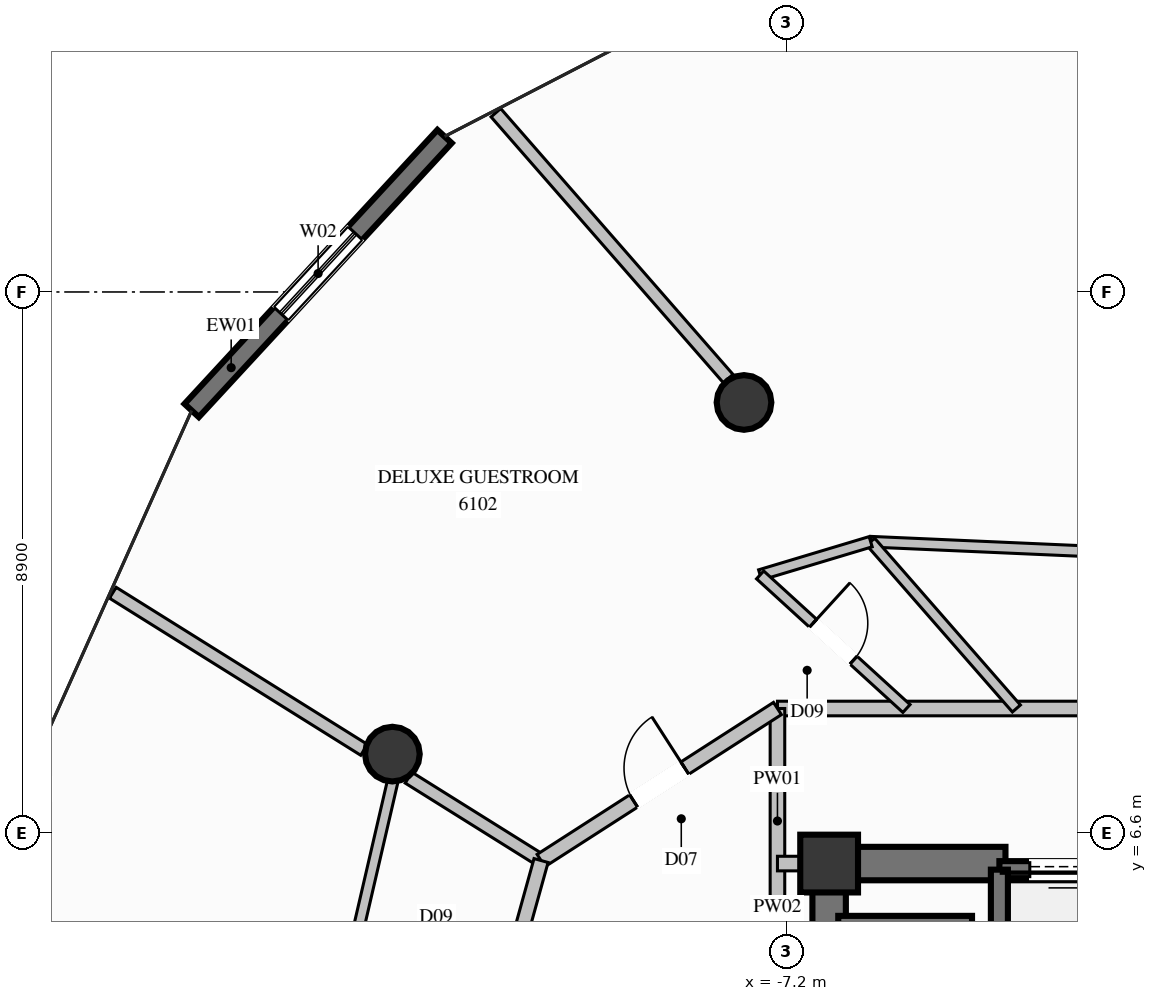
"""IFC4 building model, lengths in metres.
Left out: names, types, materials, properties, quantities, classifications, styles, units other than length and angle.
Written with IfcOpenShell. Run it as: python <this file> out.ifc"""

import sys

from ifc_helpers import new_model, si_unit, direction, frame, frame_2d, origin, origin_2d, place, context, subcontext, project, spatial, rectangle, circle, extrude, element, fill, save


model = new_model("IFC4")
c1 = context("Model", 3, precision=1e-05, world=origin(), true_north=direction((0.0, 1.0)))
c2 = subcontext(c1, "Body", "Model", "MODEL_VIEW")
j1 = project(units=[si_unit("LENGTHUNIT", "METRE"), si_unit("PLANEANGLEUNIT", "RADIAN")], contexts=[c1])
p1 = place(None, origin())
s1 = spatial("IfcSite", under=j1, at=p1, CompositionType="ELEMENT")
p2 = place(p1, origin())
s2 = spatial("IfcBuilding", under=s1, at=p2, CompositionType="ELEMENT")
p3 = place(p2, frame((0.0, 0.0, 227.2)))
s3 = spatial("IfcBuildingStorey", under=s2, at=p3, CompositionType="ELEMENT", Elevation=227.2)
p4 = place(p3, frame((-6.5, 6.1, 0.0), z_axis=(0.0, 0.0, 1.0), x_axis=(1.0, 0.0, 0.0)))
e1 = element("IfcColumn", 1, at=p4, inside=s3, PredefinedType="COLUMN", context=c2, shape_type="SweptSolid", body=[
    extrude(rectangle(XDim=0.95, YDim=0.95, at=origin_2d()), origin(), (0.0, 0.0, 1.0), 3.6),
])
p5 = place(p3, frame((-6.225, 6.1, 0.0), z_axis=(0.0, 0.0, 1.0), x_axis=(1.0, 0.0, 0.0)))
e2 = element("IfcWall", 2, at=p5, inside=s3, PredefinedType="SHEAR", context=c2, shape_type="SweptSolid", body=[
    extrude(rectangle(XDim=2.625, YDim=0.55, at=frame_2d((1.312, 0.0))), origin(), (0.0, 0.0, 1.0), 3.6),
])
p6 = place(p3, frame((-6.5, 2.35, 0.0), z_axis=(0.0, 0.0, 1.0), x_axis=(0.0, 1.0, 0.0)))
e3 = element("IfcWall", 3, at=p6, inside=s3, PredefinedType="SHEAR", context=c2, shape_type="SweptSolid", body=[
    extrude(rectangle(XDim=4.025, YDim=0.55, at=frame_2d((2.012, 0.0))), origin(), (0.0, 0.0, 1.0), 3.6),
])
for number, where, z_axis, x_axis in (
    (4, (-7.9, 13.683, 0.0), (0.0, 0.0, 1.0), (1.0, 0.0, 0.0)),
    (5, (-13.683, 7.9, 0.0), (0.0, 0.0, 1.0), (1.0, 0.0, 0.0)),
):
    element("IfcColumn", number, at=place(p3, frame(where, z_axis=z_axis, x_axis=x_axis)), inside=s3, PredefinedType="COLUMN", context=c2, shape_type="SweptSolid", body=[
        extrude(circle(Radius=0.45, at=origin_2d()), origin(), (0.0, 0.0, 1.0), 3.6),
    ])
p7 = place(p3, frame((-16.984, 13.551, 0.0), z_axis=(0.0, 0.0, 1.0), x_axis=(0.678251989905, 0.734829393935, 0.0)))
e6 = element("IfcWall", 6, at=p7, inside=s3, PredefinedType="SOLIDWALL", context=c2, shape_type="SweptSolid", body=[
    extrude(rectangle(XDim=6.132, YDim=0.32, at=frame_2d((3.066, 0.0))), origin(), (0.0, 0.0, 1.0), 3.36),
])
p8 = place(p7, frame((2.166, 0.0, 0.35)))
e7 = element("IfcOpeningElement", 7, at=p8, cuts=e6, PredefinedType="OPENING", context=c2, shape_type="SweptSolid", body=[
    extrude(rectangle(XDim=1.8, YDim=2.6, at=frame_2d((0.9, 1.3))), frame((0.0, 0.17, 0.0), z_axis=(0.0, -1.0, 0.0), x_axis=(1.0, 0.0, 0.0)), (0.0, 0.0, 1.0), 0.34),
])
p9 = place(p3, frame((-1.6, 6.0, 0.0), z_axis=(0.0, 0.0, 1.0), x_axis=(-1.0, 0.0, 0.0)))
e8 = element("IfcWall", 8, at=p9, inside=s3, PredefinedType="SOLIDWALL", context=c2, shape_type="SweptSolid", body=[
    extrude(rectangle(XDim=2.1, YDim=0.28, at=frame_2d((1.05, 0.0))), origin(), (0.0, 0.0, 1.0), 3.36),
])
p10 = place(p9, frame((0.5, 0.0, 0.0)))
e9 = element("IfcOpeningElement", 9, at=p10, cuts=e8, PredefinedType="OPENING", context=c2, shape_type="SweptSolid", body=[
    extrude(rectangle(XDim=1.1, YDim=2.2, at=frame_2d((0.55, 1.1))), frame((0.0, 0.15, 0.0), z_axis=(0.0, -1.0, 0.0), x_axis=(1.0, 0.0, 0.0)), (0.0, 0.0, 1.0), 0.3),
])
p11 = place(p3, frame((-3.7, 6.0, 0.0), z_axis=(0.0, 0.0, 1.0), x_axis=(0.0, -1.0, 0.0)))
e10 = element("IfcWall", 10, at=p11, inside=s3, PredefinedType="SOLIDWALL", context=c2, shape_type="SweptSolid", body=[
    extrude(rectangle(XDim=2.5, YDim=0.28, at=frame_2d((1.25, 0.0))), origin(), (0.0, 0.0, 1.0), 3.36),
])
p12 = place(p3, frame((-4.15, 5.1, 0.0), z_axis=(0.0, 0.0, 1.0), x_axis=(-1.0, 0.0, 0.0)))
e11 = element("IfcWall", 11, at=p12, inside=s3, PredefinedType="SOLIDWALL", context=c2, shape_type="SweptSolid", body=[
    extrude(rectangle(XDim=2.2, YDim=0.28, at=frame_2d((1.1, 0.0))), origin(), (0.0, 0.0, 1.0), 3.36),
])
p13 = place(p3, frame((-7.35, 8.65, 0.0), z_axis=(0.0, 0.0, 1.0), x_axis=(1.0, 0.0, 0.0)))
e12 = element("IfcWall", 12, at=p13, inside=s3, PredefinedType="PARTITIONING", context=c2, shape_type="SweptSolid", body=[
    extrude(rectangle(XDim=13.1, YDim=0.24, at=frame_2d((6.55, 0.0))), origin(), (0.0, 0.0, 1.0), 3.36),
])
p14 = place(p3, frame((-7.35, 4.95, 0.0), z_axis=(0.0, 0.0, 1.0), x_axis=(0.0, 1.0, 0.0)))
e13 = element("IfcWall", 13, at=p14, inside=s3, PredefinedType="PARTITIONING", context=c2, shape_type="SweptSolid", body=[
    extrude(rectangle(XDim=3.7, YDim=0.24, at=frame_2d((1.85, 0.0))), origin(), (0.0, 0.0, 1.0), 2.445),
])
p15 = place(p3, frame((-7.35, 6.1, 0.0), z_axis=(0.0, 0.0, 1.0), x_axis=(1.0, 0.0, 0.0)))
e14 = element("IfcWall", 14, at=p15, inside=s3, PredefinedType="PARTITIONING", context=c2, shape_type="SweptSolid", body=[
    extrude(rectangle(XDim=0.85, YDim=0.24, at=frame_2d((0.425, 0.0))), origin(), (0.0, 0.0, 1.0), 2.876),
])
p16 = place(p3, frame((-11.238, 6.15, 0.0), z_axis=(0.0, 0.0, 1.0), x_axis=(-0.847790113394, 0.530331899504, 0.0)))
e15 = element("IfcWall", 15, at=p16, inside=s3, PredefinedType="PARTITIONING", context=c2, shape_type="SweptSolid", body=[
    extrude(rectangle(XDim=2.57, YDim=0.21, at=frame_2d((1.285, 0.0))), origin(), (0.0, 0.0, 1.0), 2.876),
])
p17 = place(p3, frame((-14.148, 7.97, 0.0), z_axis=(0.0, 0.0, 1.0), x_axis=(-0.847922320674, 0.530120493946, 0.0)))
e16 = element("IfcWall", 16, at=p17, inside=s3, PredefinedType="PARTITIONING", context=c2, shape_type="SweptSolid", body=[
    extrude(rectangle(XDim=4.874, YDim=0.21, at=frame_2d((2.437, 0.0))), origin(), (0.0, 0.0, 1.0), 3.36),
])
p18 = place(p3, frame((-5.817, 11.393, 0.0), z_axis=(0.0, 0.0, 1.0), x_axis=(0.999028783545, -0.044062338206, 0.0)))
e17 = element("IfcWall", 17, at=p18, inside=s3, PredefinedType="PLUMBINGWALL", context=c2, shape_type="SweptSolid", body=[
    extrude(rectangle(XDim=3.746, YDim=0.175, at=frame_2d((1.873, 0.0))), origin(), (0.0, 0.0, 1.0), 3.36),
])
p19 = place(p3, frame((-5.817, 11.393, 0.0), z_axis=(0.0, 0.0, 1.0), x_axis=(0.657992027161, -0.753024894803, 0.0)))
e18 = element("IfcWall", 18, at=p19, inside=s3, PredefinedType="PLUMBINGWALL", context=c2, shape_type="SweptSolid", body=[
    extrude(rectangle(XDim=3.643, YDim=0.175, at=frame_2d((1.821, 0.0))), origin(), (0.0, 0.0, 1.0), 3.36),
])
p20 = place(p3, frame((-8.16, 14.075, 0.0), z_axis=(0.0, 0.0, 1.0), x_axis=(-0.657980612498, 0.753034868766, 0.0)))
e19 = element("IfcWall", 19, at=p20, inside=s3, PredefinedType="PARTITIONING", context=c2, shape_type="SweptSolid", body=[
    extrude(rectangle(XDim=5.807, YDim=0.21, at=frame_2d((2.904, 0.0))), origin(), (0.0, 0.0, 1.0), 3.36),
])
p21 = place(p3, frame((-7.635, 10.847, 0.0), z_axis=(0.0, 0.0, 1.0), x_axis=(0.95772357585, 0.287690028089, 0.0)))
e20 = element("IfcWall", 20, at=p21, inside=s3, PredefinedType="PLUMBINGWALL", context=c2, shape_type="SweptSolid", body=[
    extrude(rectangle(XDim=1.898, YDim=0.175, at=frame_2d((0.949, 0.0))), origin(), (0.0, 0.0, 1.0), 3.36),
])
p22 = place(p3, frame((-7.635, 10.847, 0.0), z_axis=(0.0, 0.0, 1.0), x_axis=(0.738586041598, -0.674159223891, 0.0)))
e21 = element("IfcWall", 21, at=p22, inside=s3, PredefinedType="PLUMBINGWALL", context=c2, shape_type="SweptSolid", body=[
    extrude(rectangle(XDim=3.259, YDim=0.175, at=frame_2d((1.629, 0.0))), origin(), (0.0, 0.0, 1.0), 3.36),
])
p23 = place(p22, frame((1.179, 0.0, 0.0)))
e22 = element("IfcOpeningElement", 22, at=p23, cuts=e21, PredefinedType="OPENING", context=c2, shape_type="SweptSolid", body=[
    extrude(rectangle(XDim=0.9, YDim=2.1, at=frame_2d((0.45, 1.05))), frame((0.0, 0.098, 0.0), z_axis=(0.0, -1.0, 0.0), x_axis=(1.0, 0.0, 0.0)), (0.0, 0.0, 1.0), 0.195),
])
p24 = place(p3, frame((-11.238, 6.15, 0.0), z_axis=(0.0, 0.0, 1.0), x_axis=(0.841118406986, 0.540851019625, 0.0)))
e23 = element("IfcWall", 23, at=p24, inside=s3, PredefinedType="PARTITIONING", context=c2, shape_type="SweptSolid", body=[
    extrude(rectangle(XDim=4.622, YDim=0.24, at=frame_2d((2.311, 0.0))), origin(), (0.0, 0.0, 1.0), 3.36),
])
p25 = place(p24, frame((1.811, 0.0, 0.0)))
e24 = element("IfcOpeningElement", 24, at=p25, cuts=e23, PredefinedType="OPENING", context=c2, shape_type="SweptSolid", body=[
    extrude(rectangle(XDim=1.0, YDim=2.2, at=frame_2d((0.5, 1.1))), frame((0.0, 0.13, 0.0), z_axis=(0.0, -1.0, 0.0), x_axis=(1.0, 0.0, 0.0)), (0.0, 0.0, 1.0), 0.26),
])
p26 = place(p3, frame((-11.238, 6.15, 0.0), z_axis=(0.0, 0.0, 1.0), x_axis=(-0.267361785392, -0.963596220266, 0.0)))
e25 = element("IfcWall", 25, at=p26, inside=s3, PredefinedType="PARTITIONING", context=c2, shape_type="SweptSolid", body=[
    extrude(rectangle(XDim=2.768, YDim=0.24, at=frame_2d((1.384, 0.0))), origin(), (0.0, 0.0, 1.0), 3.36),
])
p27 = place(p3, frame((-13.633, 7.647, 0.0), z_axis=(0.0, 0.0, 1.0), x_axis=(-0.226023632271, -0.974121818694, 0.0)))
e26 = element("IfcWall", 26, at=p27, inside=s3, PredefinedType="PLUMBINGWALL", context=c2, shape_type="SweptSolid", body=[
    extrude(rectangle(XDim=3.354, YDim=0.175, at=frame_2d((1.677, 0.0))), origin(), (0.0, 0.0, 1.0), 2.929),
])
p28 = place(p8, origin())
e27 = element("IfcWindow", 27, at=p28, inside=s3, PartitioningType="SINGLE_PANEL", PredefinedType="WINDOW", context=c2, shape_type="SweptSolid", body=[
    extrude(rectangle(XDim=1.8, YDim=2.6, at=frame_2d((0.9, 1.3))), frame((0.0, 0.03, 0.0), z_axis=(0.0, -1.0, 0.0), x_axis=(1.0, 0.0, 0.0)), (0.0, 0.0, 1.0), 0.06),
])
fill(e7, e27)
p29 = place(p10, origin())
e28 = element("IfcDoor", 28, at=p29, inside=s3, OperationType="SLIDING_TO_LEFT", PredefinedType="DOOR", context=c2, shape_type="SweptSolid", body=[
    extrude(rectangle(XDim=1.1, YDim=2.2, at=frame_2d((0.55, 1.1))), frame((0.0, 0.025, 0.0), z_axis=(0.0, -1.0, 0.0), x_axis=(1.0, 0.0, 0.0)), (0.0, 0.0, 1.0), 0.05),
])
fill(e9, e28)
p30 = place(p23, origin())
e29 = element("IfcDoor", 29, at=p30, inside=s3, OperationType="SINGLE_SWING_LEFT", PredefinedType="DOOR", context=c2, shape_type="SweptSolid", body=[
    extrude(rectangle(XDim=0.9, YDim=2.1, at=frame_2d((0.45, 1.05))), frame((0.0, 0.025, 0.0), z_axis=(0.0, -1.0, 0.0), x_axis=(1.0, 0.0, 0.0)), (0.0, 0.0, 1.0), 0.05),
])
fill(e22, e29)
p31 = place(p25, origin())
e30 = element("IfcDoor", 30, at=p31, inside=s3, OperationType="SINGLE_SWING_RIGHT", PredefinedType="DOOR", context=c2, shape_type="SweptSolid", body=[
    extrude(rectangle(XDim=1.0, YDim=2.2, at=frame_2d((0.5, 1.1))), frame((0.0, 0.025, 0.0), z_axis=(0.0, -1.0, 0.0), x_axis=(1.0, 0.0, 0.0)), (0.0, 0.0, 1.0), 0.05),
])
fill(e24, e30)
save(model, sys.argv[1])
